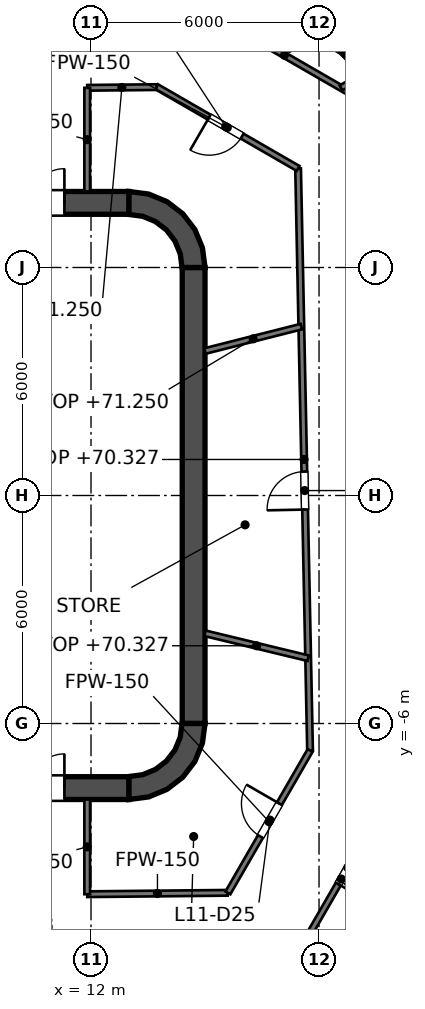
"""IFC4 building model, lengths in metres.
Left out: names, types, materials, properties, quantities, classifications, styles, units other than length and angle.
Written with IfcOpenShell. Run it as: python <this file> out.ifc"""

import sys

from ifc_helpers import new_model, si_unit, direction, frame, frame_2d, origin, place, context, subcontext, project, spatial, polyline, rectangle, outline, extrude, element, fill, save


model = new_model("IFC4")
c1 = context("Model", 3, precision=1e-05, world=origin(), true_north=direction((0.0, 1.0)))
c2 = subcontext(c1, "Body", "Model", "MODEL_VIEW")
j1 = project(units=[si_unit("LENGTHUNIT", "METRE"), si_unit("PLANEANGLEUNIT", "RADIAN")], contexts=[c1])
p1 = place(None, origin())
s1 = spatial("IfcSite", under=j1, at=p1, CompositionType="ELEMENT")
p2 = place(p1, origin())
s2 = spatial("IfcBuilding", under=s1, at=p2, CompositionType="ELEMENT")
p3 = place(p2, frame((0.0, 0.0, 67.2)))
s3 = spatial("IfcBuildingStorey", under=s2, at=p3, CompositionType="ELEMENT", Elevation=67.2)
p4 = place(p3, frame((-13.0, 7.7, 0.0), z_axis=(0.0, 0.0, 1.0), x_axis=(1.0, 0.0, 0.0)))
e1 = element("IfcWall", 1, at=p4, inside=s3, PredefinedType="SHEAR", context=c2, shape_type="SweptSolid", body=[
    extrude(rectangle(XDim=26.0, YDim=0.6, at=frame_2d((13.0, 0.0))), origin(), (0.0, 0.0, 1.0), 4.2),
])
p5 = place(p4, frame((1.7, 0.0, 0.0)))
e2 = element("IfcOpeningElement", 2, at=p5, cuts=e1, PredefinedType="OPENING", context=c2, shape_type="SweptSolid", body=[
    extrude(rectangle(XDim=1.8, YDim=2.1, at=frame_2d((0.9, 1.05))), frame((0.0, 0.3, 0.0), z_axis=(0.0, -1.0, 0.0), x_axis=(1.0, 0.0, 0.0)), (0.0, 0.0, 1.0), 0.6),
])
p6 = place(p4, frame((22.5, 0.0, 0.0)))
e3 = element("IfcOpeningElement", 3, at=p6, cuts=e1, PredefinedType="OPENING", context=c2, shape_type="SweptSolid", body=[
    extrude(rectangle(XDim=1.8, YDim=2.1, at=frame_2d((0.9, 1.05))), frame((0.0, 0.3, 0.0), z_axis=(0.0, -1.0, 0.0), x_axis=(1.0, 0.0, 0.0)), (0.0, 0.0, 1.0), 0.6),
])
p7 = place(p3, frame((-13.0, -7.7, 0.0), z_axis=(0.0, 0.0, 1.0), x_axis=(1.0, 0.0, 0.0)))
e4 = element("IfcWall", 4, at=p7, inside=s3, PredefinedType="SHEAR", context=c2, shape_type="SweptSolid", body=[
    extrude(rectangle(XDim=26.0, YDim=0.6, at=frame_2d((13.0, 0.0))), origin(), (0.0, 0.0, 1.0), 4.2),
])
p8 = place(p7, frame((1.7, 0.0, 0.0)))
e5 = element("IfcOpeningElement", 5, at=p8, cuts=e4, PredefinedType="OPENING", context=c2, shape_type="SweptSolid", body=[
    extrude(rectangle(XDim=1.8, YDim=2.1, at=frame_2d((0.9, 1.05))), frame((0.0, 0.3, 0.0), z_axis=(0.0, -1.0, 0.0), x_axis=(1.0, 0.0, 0.0)), (0.0, 0.0, 1.0), 0.6),
])
p9 = place(p7, frame((22.5, 0.0, 0.0)))
e6 = element("IfcOpeningElement", 6, at=p9, cuts=e4, PredefinedType="OPENING", context=c2, shape_type="SweptSolid", body=[
    extrude(rectangle(XDim=1.8, YDim=2.1, at=frame_2d((0.9, 1.05))), frame((0.0, 0.3, 0.0), z_axis=(0.0, -1.0, 0.0), x_axis=(1.0, 0.0, 0.0)), (0.0, 0.0, 1.0), 0.6),
])
p10 = place(p3, frame((14.7, -6.0, 0.0), z_axis=(0.0, 0.0, 1.0), x_axis=(0.0, 1.0, 0.0)))
e7 = element("IfcWall", 7, at=p10, inside=s3, PredefinedType="SHEAR", context=c2, shape_type="SweptSolid", body=[
    extrude(rectangle(XDim=12.0, YDim=0.6, at=frame_2d((6.0, 0.0))), origin(), (0.0, 0.0, 1.0), 4.2),
])
p11 = place(p3, origin())
e8 = element("IfcWall", 8, at=p11, inside=s3, PredefinedType="SHEAR", context=c2, shape_type="SweptSolid", body=[
    extrude(outline(polyline([(13.0, 8.0), (13.0, 7.395), (13.361, 7.347), (13.698, 7.208), (13.986, 6.986), (14.208, 6.698), (14.347, 6.361), (14.395, 6.0), (15.0, 6.0), (14.932, 6.518), (14.732, 7.0), (14.414, 7.414), (14.0, 7.732), (13.518, 7.932), (13.0, 8.0)])), origin(), (0.0, 0.0, 1.0), 4.2),
])
e9 = element("IfcWall", 9, at=p11, inside=s3, PredefinedType="SHEAR", context=c2, shape_type="SweptSolid", body=[
    extrude(outline(polyline([(15.0, -6.0), (14.395, -6.0), (14.347, -6.361), (14.208, -6.698), (13.986, -6.986), (13.698, -7.208), (13.361, -7.347), (13.0, -7.395), (13.0, -8.0), (13.518, -7.932), (14.0, -7.732), (14.414, -7.414), (14.732, -7.0), (14.932, -6.518), (15.0, -6.0)])), origin(), (0.0, 0.0, 1.0), 4.2),
])
p12 = place(p3, frame((11.8, -7.4, 0.0), z_axis=(0.0, 0.0, 1.0), x_axis=(0.0, 1.0, 0.0)))
e10 = element("IfcWall", 10, at=p12, inside=s3, PredefinedType="SOLIDWALL", context=c2, shape_type="SweptSolid", body=[
    extrude(rectangle(XDim=14.8, YDim=0.4, at=frame_2d((7.4, 0.0))), origin(), (0.0, 0.0, 1.0), 4.05),
])
p13 = place(p12, frame((11.2, 0.0, 0.0)))
e11 = element("IfcOpeningElement", 11, at=p13, cuts=e10, PredefinedType="OPENING", context=c2, shape_type="SweptSolid", body=[
    extrude(rectangle(XDim=1.1, YDim=2.1, at=frame_2d((0.55, 1.05))), frame((0.0, 0.2, 0.0), z_axis=(0.0, -1.0, 0.0), x_axis=(1.0, 0.0, 0.0)), (0.0, 0.0, 1.0), 0.4),
])
p14 = place(p12, frame((8.3, 0.0, 0.0)))
e12 = element("IfcOpeningElement", 12, at=p14, cuts=e10, PredefinedType="OPENING", context=c2, shape_type="SweptSolid", body=[
    extrude(rectangle(XDim=1.1, YDim=2.1, at=frame_2d((0.55, 1.05))), frame((0.0, 0.2, 0.0), z_axis=(0.0, -1.0, 0.0), x_axis=(1.0, 0.0, 0.0)), (0.0, 0.0, 1.0), 0.4),
])
p15 = place(p12, frame((5.4, 0.0, 0.0)))
e13 = element("IfcOpeningElement", 13, at=p15, cuts=e10, PredefinedType="OPENING", context=c2, shape_type="SweptSolid", body=[
    extrude(rectangle(XDim=1.1, YDim=2.1, at=frame_2d((0.55, 1.05))), frame((0.0, 0.2, 0.0), z_axis=(0.0, -1.0, 0.0), x_axis=(1.0, 0.0, 0.0)), (0.0, 0.0, 1.0), 0.4),
])
p16 = place(p12, frame((13.552, 0.0, 0.0)))
e14 = element("IfcOpeningElement", 14, at=p16, cuts=e10, PredefinedType="OPENING", context=c2, shape_type="SweptSolid", body=[
    extrude(rectangle(XDim=0.9, YDim=2.1, at=frame_2d((0.45, 1.05))), frame((0.0, 0.2, 0.0), z_axis=(0.0, -1.0, 0.0), x_axis=(1.0, 0.0, 0.0)), (0.0, 0.0, 1.0), 0.4),
])
p17 = place(p12, frame((0.347, 0.0, 0.0)))
e15 = element("IfcOpeningElement", 15, at=p17, cuts=e10, PredefinedType="OPENING", context=c2, shape_type="SweptSolid", body=[
    extrude(rectangle(XDim=0.9, YDim=2.1, at=frame_2d((0.45, 1.05))), frame((0.0, 0.2, 0.0), z_axis=(0.0, -1.0, 0.0), x_axis=(1.0, 0.0, 0.0)), (0.0, 0.0, 1.0), 0.4),
])
e16 = element("IfcWall", 16, at=p11, inside=s3, PredefinedType="SOLIDWALL", context=c2, shape_type="SweptSolid", body=[
    extrude(outline(polyline([(12.0, -5.675), (12.0, -5.925), (14.15, -5.925), (14.4, -5.925), (14.4, -5.675), (14.4, -3.025), (14.4, -2.775), (14.4, -0.125), (14.4, 0.125), (14.4, 2.775), (14.4, 3.025), (14.4, 5.675), (14.4, 5.925), (14.15, 5.925), (12.0, 5.925), (12.0, 5.675), (14.15, 5.675), (14.15, 3.025), (12.0, 3.025), (12.0, 2.775), (14.15, 2.775), (14.15, 0.125), (12.0, 0.125), (12.0, -0.125), (14.15, -0.125), (14.15, -2.775), (12.0, -2.775), (12.0, -3.025), (14.15, -3.025), (14.15, -5.675), (12.0, -5.675)])), origin(), (0.0, 0.0, 1.0), 4.05),
])
p18 = place(p3, frame((17.449, 8.606, 0.0), z_axis=(0.0, 0.0, 1.0), x_axis=(0.020558666055, -0.99978864829, 0.0)))
e17 = element("IfcWall", 17, at=p18, inside=s3, PredefinedType="PARTITIONING", context=c2, shape_type="SweptSolid", body=[
    extrude(rectangle(XDim=15.319, YDim=0.15, at=frame_2d((7.66, 0.0))), origin(), (0.0, 0.0, 1.0), 3.127),
])
p19 = place(p18, frame((7.978, 0.0, 0.0)))
e18 = element("IfcOpeningElement", 18, at=p19, cuts=e17, PredefinedType="OPENING", context=c2, shape_type="SweptSolid", body=[
    extrude(rectangle(XDim=1.0, YDim=2.1, at=frame_2d((0.5, 1.05))), frame((0.0, 0.075, 0.0), z_axis=(0.0, -1.0, 0.0), x_axis=(1.0, 0.0, 0.0)), (0.0, 0.0, 1.0), 0.15),
])
p20 = place(p3, frame((13.724, 10.757, 0.0), z_axis=(0.0, 0.0, 1.0), x_axis=(0.86594264414, -0.500143316521, 0.0)))
e19 = element("IfcWall", 19, at=p20, inside=s3, PredefinedType="PARTITIONING", context=c2, shape_type="SweptSolid", body=[
    extrude(rectangle(XDim=4.302, YDim=0.15, at=frame_2d((2.151, 0.0))), origin(), (0.0, 0.0, 1.0), 3.195),
])
p21 = place(p20, frame((1.602, 0.0, 0.0)))
e20 = element("IfcOpeningElement", 20, at=p21, cuts=e19, PredefinedType="OPENING", context=c2, shape_type="SweptSolid", body=[
    extrude(rectangle(XDim=1.0, YDim=2.1, at=frame_2d((0.5, 1.05))), frame((0.0, 0.075, 0.0), z_axis=(0.0, -1.0, 0.0), x_axis=(1.0, 0.0, 0.0)), (0.0, 0.0, 1.0), 0.15),
])
p22 = place(p3, frame((14.356, 13.164, 0.0), z_axis=(0.0, 0.0, 1.0), x_axis=(0.865974907157, -0.500087452527, 0.0)))
e21 = element("IfcWall", 21, at=p22, inside=s3, PredefinedType="PARTITIONING", context=c2, shape_type="SweptSolid", body=[
    extrude(rectangle(XDim=6.311, YDim=0.15, at=frame_2d((3.155, 0.0))), origin(), (0.0, 0.0, 1.0), 3.195),
])
p23 = place(p22, frame((0.601, 0.0, 0.0)))
e22 = element("IfcOpeningElement", 22, at=p23, cuts=e21, PredefinedType="OPENING", context=c2, shape_type="SweptSolid", body=[
    extrude(rectangle(XDim=1.0, YDim=2.1, at=frame_2d((0.5, 1.05))), frame((0.0, 0.075, 0.0), z_axis=(0.0, -1.0, 0.0), x_axis=(1.0, 0.0, 0.0)), (0.0, 0.0, 1.0), 0.15),
])
p24 = place(p3, frame((15.0, -3.626, 0.0), z_axis=(0.0, 0.0, 1.0), x_axis=(0.972005156389, -0.234959519818, 0.0)))
e23 = element("IfcWall", 23, at=p24, inside=s3, PredefinedType="PARTITIONING", context=c2, shape_type="SweptSolid", body=[
    extrude(rectangle(XDim=2.793, YDim=0.15, at=frame_2d((1.396, 0.0))), origin(), (0.0, 0.0, 1.0), 3.127),
])
p25 = place(p3, frame((11.9, -10.492, 0.0), z_axis=(0.0, 0.0, 1.0), x_axis=(0.999950943482, 0.009905080996, 0.0)))
e24 = element("IfcWall", 24, at=p25, inside=s3, PredefinedType="PARTITIONING", context=c2, shape_type="SweptSolid", body=[
    extrude(rectangle(XDim=3.697, YDim=0.15, at=frame_2d((1.849, 0.0))), origin(), (0.0, 0.0, 1.0), 3.195),
])
p26 = place(p3, frame((11.9, 10.728, 0.0), z_axis=(0.0, 0.0, 1.0), x_axis=(0.999950962562, 0.009903154608, 0.0)))
e25 = element("IfcWall", 25, at=p26, inside=s3, PredefinedType="PARTITIONING", context=c2, shape_type="SweptSolid", body=[
    extrude(rectangle(XDim=1.824, YDim=0.15, at=frame_2d((0.912, 0.0))), origin(), (0.0, 0.0, 1.0), 4.05),
])
p27 = place(p3, frame((15.0, 3.802, 0.0), z_axis=(0.0, 0.0, 1.0), x_axis=(0.969340978535, 0.245719489117, 0.0)))
e26 = element("IfcWall", 26, at=p27, inside=s3, PredefinedType="PARTITIONING", context=c2, shape_type="SweptSolid", body=[
    extrude(rectangle(XDim=2.615, YDim=0.15, at=frame_2d((1.308, 0.0))), origin(), (0.0, 0.0, 1.0), 4.05),
])
p28 = place(p3, frame((18.578, 10.726, 0.0), z_axis=(0.0, 0.0, 1.0), x_axis=(0.866203514255, 0.499691376644, 0.0)))
e27 = element("IfcWall", 27, at=p28, inside=s3, PredefinedType="PARTITIONING", context=c2, shape_type="SweptSolid", body=[
    extrude(rectangle(XDim=0.68, YDim=0.15, at=frame_2d((0.34, 0.0))), origin(), (0.0, 0.0, 1.0), 4.05),
])
p29 = place(p3, frame((16.99, -12.853, 0.0), z_axis=(0.0, 0.0, 1.0), x_axis=(0.500026252906, 0.866010246132, 0.0)))
e28 = element("IfcWall", 28, at=p29, inside=s3, PredefinedType="PARTITIONING", context=c2, shape_type="SweptSolid", body=[
    extrude(rectangle(XDim=6.377, YDim=0.15, at=frame_2d((3.188, 0.0))), origin(), (0.0, 0.0, 1.0), 3.195),
])
p30 = place(p29, frame((3.033, 0.0, 0.0)))
e29 = element("IfcOpeningElement", 29, at=p30, cuts=e28, PredefinedType="OPENING", context=c2, shape_type="SweptSolid", body=[
    extrude(rectangle(XDim=1.0, YDim=2.1, at=frame_2d((0.5, 1.05))), frame((0.0, 0.075, 0.0), z_axis=(0.0, -1.0, 0.0), x_axis=(1.0, 0.0, 0.0)), (0.0, 0.0, 1.0), 0.15),
])
p31 = place(p3, frame((15.602, -10.457, 0.0), z_axis=(0.0, 0.0, 1.0), x_axis=(0.500017157925, 0.866015497425, 0.0)))
e30 = element("IfcWall", 30, at=p31, inside=s3, PredefinedType="PARTITIONING", context=c2, shape_type="SweptSolid", body=[
    extrude(rectangle(XDim=4.326, YDim=0.15, at=frame_2d((2.163, 0.0))), origin(), (0.0, 0.0, 1.0), 3.195),
])
p32 = place(p31, frame((1.712, 0.0, 0.0)))
e31 = element("IfcOpeningElement", 31, at=p32, cuts=e30, PredefinedType="OPENING", context=c2, shape_type="SweptSolid", body=[
    extrude(rectangle(XDim=1.0, YDim=2.1, at=frame_2d((0.5, 1.05))), frame((0.0, 0.075, 0.0), z_axis=(0.0, -1.0, 0.0), x_axis=(1.0, 0.0, 0.0)), (0.0, 0.0, 1.0), 0.15),
])
p33 = place(p3, frame((11.9, -10.492, 0.0), z_axis=(0.0, 0.0, 1.0), x_axis=(0.0, 1.0, 0.0)))
e32 = element("IfcWall", 32, at=p33, inside=s3, PredefinedType="PARTITIONING", context=c2, shape_type="SweptSolid", body=[
    extrude(rectangle(XDim=2.492, YDim=0.15, at=frame_2d((1.246, 0.0))), origin(), (0.0, 0.0, 1.0), 3.195),
])
p34 = place(p3, frame((11.9, 8.0, 0.0), z_axis=(0.0, 0.0, 1.0), x_axis=(0.0, 1.0, 0.0)))
e33 = element("IfcWall", 33, at=p34, inside=s3, PredefinedType="PARTITIONING", context=c2, shape_type="SweptSolid", body=[
    extrude(rectangle(XDim=2.728, YDim=0.15, at=frame_2d((1.364, 0.0))), origin(), (0.0, 0.0, 1.0), 3.195),
])
p35 = place(p3, frame((18.569, 11.664, 0.0), z_axis=(0.0, 0.0, 1.0), x_axis=(0.707082870229, -0.707130691335, 0.0)))
e34 = element("IfcWall", 34, at=p35, inside=s3, PredefinedType="PARTITIONING", context=c2, shape_type="SweptSolid", body=[
    extrude(rectangle(XDim=5.105, YDim=0.05, at=frame_2d((2.553, 0.0))), origin(), (0.0, 0.0, 1.0), 3.195),
])
p36 = place(p35, frame((2.476, 0.0, 0.0)))
e35 = element("IfcOpeningElement", 35, at=p36, cuts=e34, PredefinedType="OPENING", context=c2, shape_type="SweptSolid", body=[
    extrude(rectangle(XDim=1.0, YDim=2.1, at=frame_2d((0.5, 1.05))), frame((0.0, 0.025, 0.0), z_axis=(0.0, -1.0, 0.0), x_axis=(1.0, 0.0, 0.0)), (0.0, 0.0, 1.0), 0.05),
])
p37 = place(p3, frame((16.993, 12.574, 0.0), z_axis=(0.0, 0.0, 1.0), x_axis=(0.866047089031, -0.499962438169, 0.0)))
e36 = element("IfcWall", 36, at=p37, inside=s3, PredefinedType="PARTITIONING", context=c2, shape_type="SweptSolid", body=[
    extrude(rectangle(XDim=1.82, YDim=0.05, at=frame_2d((0.91, 0.0))), origin(), (0.0, 0.0, 1.0), 3.195),
])
p38 = place(p13, origin())
e37 = element("IfcDoor", 37, at=p38, inside=s3, OperationType="DOUBLE_DOOR_SLIDING", PredefinedType="DOOR", context=c2, shape_type="SweptSolid", body=[
    extrude(rectangle(XDim=1.1, YDim=2.1, at=frame_2d((0.55, 1.05))), frame((0.0, 0.025, 0.0), z_axis=(0.0, -1.0, 0.0), x_axis=(1.0, 0.0, 0.0)), (0.0, 0.0, 1.0), 0.05),
])
fill(e11, e37)
p39 = place(p14, origin())
e38 = element("IfcDoor", 38, at=p39, inside=s3, OperationType="DOUBLE_DOOR_SLIDING", PredefinedType="DOOR", context=c2, shape_type="SweptSolid", body=[
    extrude(rectangle(XDim=1.1, YDim=2.1, at=frame_2d((0.55, 1.05))), frame((0.0, 0.025, 0.0), z_axis=(0.0, -1.0, 0.0), x_axis=(1.0, 0.0, 0.0)), (0.0, 0.0, 1.0), 0.05),
])
fill(e12, e38)
p40 = place(p15, origin())
e39 = element("IfcDoor", 39, at=p40, inside=s3, OperationType="DOUBLE_DOOR_SLIDING", PredefinedType="DOOR", context=c2, shape_type="SweptSolid", body=[
    extrude(rectangle(XDim=1.1, YDim=2.1, at=frame_2d((0.55, 1.05))), frame((0.0, 0.025, 0.0), z_axis=(0.0, -1.0, 0.0), x_axis=(1.0, 0.0, 0.0)), (0.0, 0.0, 1.0), 0.05),
])
fill(e13, e39)
p41 = place(p16, origin())
e40 = element("IfcDoor", 40, at=p41, inside=s3, OperationType="SINGLE_SWING_RIGHT", PredefinedType="DOOR", context=c2, shape_type="SweptSolid", body=[
    extrude(rectangle(XDim=0.9, YDim=2.1, at=frame_2d((0.45, 1.05))), frame((0.0, 0.025, 0.0), z_axis=(0.0, -1.0, 0.0), x_axis=(1.0, 0.0, 0.0)), (0.0, 0.0, 1.0), 0.05),
])
fill(e14, e40)
p42 = place(p17, origin())
e41 = element("IfcDoor", 41, at=p42, inside=s3, OperationType="SINGLE_SWING_RIGHT", PredefinedType="DOOR", context=c2, shape_type="SweptSolid", body=[
    extrude(rectangle(XDim=0.9, YDim=2.1, at=frame_2d((0.45, 1.05))), frame((0.0, 0.025, 0.0), z_axis=(0.0, -1.0, 0.0), x_axis=(1.0, 0.0, 0.0)), (0.0, 0.0, 1.0), 0.05),
])
fill(e15, e41)
p43 = place(p6, origin())
e42 = element("IfcDoor", 42, at=p43, inside=s3, OperationType="DOUBLE_DOOR_SINGLE_SWING", PredefinedType="DOOR", context=c2, shape_type="SweptSolid", body=[
    extrude(rectangle(XDim=1.8, YDim=2.1, at=frame_2d((0.9, 1.05))), frame((0.0, 0.025, 0.0), z_axis=(0.0, -1.0, 0.0), x_axis=(1.0, 0.0, 0.0)), (0.0, 0.0, 1.0), 0.05),
])
fill(e3, e42)
p44 = place(p9, origin())
e43 = element("IfcDoor", 43, at=p44, inside=s3, OperationType="DOUBLE_DOOR_SINGLE_SWING", PredefinedType="DOOR", context=c2, shape_type="SweptSolid", body=[
    extrude(rectangle(XDim=1.8, YDim=2.1, at=frame_2d((0.9, 1.05))), frame((0.0, 0.025, 0.0), z_axis=(0.0, -1.0, 0.0), x_axis=(1.0, 0.0, 0.0)), (0.0, 0.0, 1.0), 0.05),
])
fill(e6, e43)
p45 = place(p32, origin())
e44 = element("IfcDoor", 44, at=p45, inside=s3, OperationType="SINGLE_SWING_RIGHT", PredefinedType="DOOR", context=c2, shape_type="SweptSolid", body=[
    extrude(rectangle(XDim=1.0, YDim=2.1, at=frame_2d((0.5, 1.05))), frame((0.0, 0.025, 0.0), z_axis=(0.0, -1.0, 0.0), x_axis=(1.0, 0.0, 0.0)), (0.0, 0.0, 1.0), 0.05),
])
fill(e31, e44)
p46 = place(p19, origin())
e45 = element("IfcDoor", 45, at=p46, inside=s3, OperationType="SINGLE_SWING_RIGHT", PredefinedType="DOOR", context=c2, shape_type="SweptSolid", body=[
    extrude(rectangle(XDim=1.0, YDim=2.1, at=frame_2d((0.5, 1.05))), frame((0.0, 0.025, 0.0), z_axis=(0.0, -1.0, 0.0), x_axis=(1.0, 0.0, 0.0)), (0.0, 0.0, 1.0), 0.05),
])
fill(e18, e45)
p47 = place(p21, origin())
e46 = element("IfcDoor", 46, at=p47, inside=s3, OperationType="SINGLE_SWING_LEFT", PredefinedType="DOOR", context=c2, shape_type="SweptSolid", body=[
    extrude(rectangle(XDim=1.0, YDim=2.1, at=frame_2d((0.5, 1.05))), frame((0.0, 0.025, 0.0), z_axis=(0.0, -1.0, 0.0), x_axis=(1.0, 0.0, 0.0)), (0.0, 0.0, 1.0), 0.05),
])
fill(e20, e46)
p48 = place(p30, origin())
e47 = element("IfcDoor", 47, at=p48, inside=s3, OperationType="SINGLE_SWING_LEFT", PredefinedType="DOOR", context=c2, shape_type="SweptSolid", body=[
    extrude(rectangle(XDim=1.0, YDim=2.1, at=frame_2d((0.5, 1.05))), frame((0.0, 0.025, 0.0), z_axis=(0.0, -1.0, 0.0), x_axis=(1.0, 0.0, 0.0)), (0.0, 0.0, 1.0), 0.05),
])
fill(e29, e47)
save(model, sys.argv[1])
